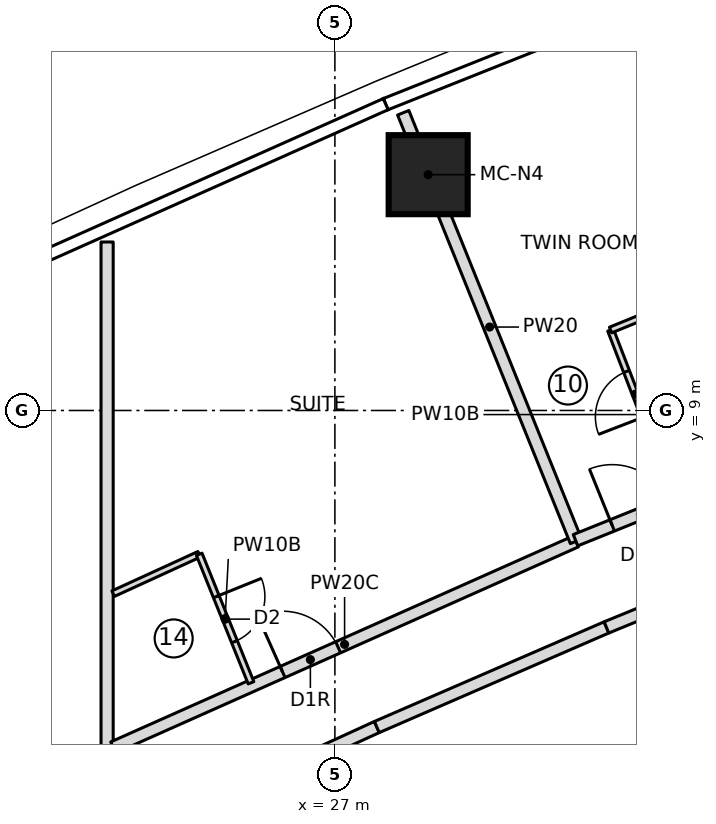
"""IFC4 building model, lengths in metres.
Left out: names, types, materials, properties, quantities, classifications, styles, units other than length and angle.
Written with IfcOpenShell. Run it as: python <this file> out.ifc"""

import sys

from ifc_helpers import new_model, si_unit, direction, frame, frame_2d, origin, origin_2d, place, context, subcontext, project, spatial, rectangle, extrude, element, fill, save


model = new_model("IFC4")
c1 = context("Model", 3, precision=1e-05, world=origin(), true_north=direction((0.0, 1.0)))
c2 = subcontext(c1, "Body", "Model", "MODEL_VIEW")
j1 = project(units=[si_unit("LENGTHUNIT", "METRE"), si_unit("PLANEANGLEUNIT", "RADIAN")], contexts=[c1])
p1 = place(None, origin())
s1 = spatial("IfcSite", under=j1, at=p1, CompositionType="ELEMENT")
p2 = place(p1, origin())
s2 = spatial("IfcBuilding", under=s1, at=p2, CompositionType="ELEMENT")
p3 = place(p2, frame((0.0, 0.0, 207.45)))
s3 = spatial("IfcBuildingStorey", under=s2, at=p3, CompositionType="ELEMENT", Elevation=207.45)
p4 = place(p3, frame((28.534, 12.878, 0.0), z_axis=(0.0, 0.0, 1.0), x_axis=(1.0, 0.0, 0.0)))
e1 = element("IfcColumn", 1, at=p4, inside=s3, PredefinedType="COLUMN", context=c2, shape_type="SweptSolid", body=[
    extrude(rectangle(XDim=1.3, YDim=1.3, at=origin_2d()), origin(), (0.0, 0.0, 1.0), 3.55),
])
p5 = place(p3, frame((23.254, -11.771, 0.0), z_axis=(0.0, 0.0, 1.0), x_axis=(0.0, 1.0, 0.0)))
e2 = element("IfcWall", 2, at=p5, inside=s3, PredefinedType="PARTITIONING", context=c2, shape_type="SweptSolid", body=[
    extrude(rectangle(XDim=23.542, YDim=0.2, at=frame_2d((11.771, 0.0))), origin(), (0.0, 0.0, 1.0), 3.15),
])
p6 = place(p5, frame((14.125, 0.0, 0.0)))
e3 = element("IfcOpeningElement", 3, at=p6, cuts=e2, PredefinedType="OPENING", context=c2, shape_type="SweptSolid", body=[
    extrude(rectangle(XDim=1.0, YDim=2.1, at=frame_2d((0.5, 1.05))), frame((0.0, 0.11, 0.0), z_axis=(0.0, -1.0, 0.0), x_axis=(1.0, 0.0, 0.0)), (0.0, 0.0, 1.0), 0.22),
])
p7 = place(p5, frame((8.417, 0.0, 0.0)))
e4 = element("IfcOpeningElement", 4, at=p7, cuts=e2, PredefinedType="OPENING", context=c2, shape_type="SweptSolid", body=[
    extrude(rectangle(XDim=1.0, YDim=2.1, at=frame_2d((0.5, 1.05))), frame((0.0, 0.11, 0.0), z_axis=(0.0, -1.0, 0.0), x_axis=(1.0, 0.0, 0.0)), (0.0, 0.0, 1.0), 0.22),
])
p8 = place(p3, frame((23.354, 3.458, 0.0), z_axis=(0.0, 0.0, 1.0), x_axis=(0.913485016927, 0.406872368009, 0.0)))
e5 = element("IfcWall", 5, at=p8, inside=s3, PredefinedType="PARTITIONING", context=c2, shape_type="SweptSolid", body=[
    extrude(rectangle(XDim=8.332, YDim=0.2, at=frame_2d((4.166, 0.0))), origin(), (0.0, 0.0, 1.0), 3.15),
])
p9 = place(p8, frame((3.05, 0.0, 0.0)))
e6 = element("IfcOpeningElement", 6, at=p9, cuts=e5, PredefinedType="OPENING", context=c2, shape_type="SweptSolid", body=[
    extrude(rectangle(XDim=1.0, YDim=2.1, at=frame_2d((0.5, 1.05))), frame((0.0, 0.11, 0.0), z_axis=(0.0, -1.0, 0.0), x_axis=(1.0, 0.0, 0.0)), (0.0, 0.0, 1.0), 0.22),
])
p10 = place(p3, frame((23.354, 5.987, 0.0), z_axis=(0.0, 0.0, 1.0), x_axis=(0.909158902999, 0.416449383597, 0.0)))
e7 = element("IfcWall", 7, at=p10, inside=s3, PredefinedType="PARTITIONING", context=c2, shape_type="SweptSolid", body=[
    extrude(rectangle(XDim=1.556, YDim=0.1, at=frame_2d((0.778, 0.0))), origin(), (0.0, 0.0, 1.0), 3.15),
])
p11 = place(p3, frame((24.769, 6.635, 0.0), z_axis=(0.0, 0.0, 1.0), x_axis=(0.373956446544, -0.927446265877, 0.0)))
e8 = element("IfcWall", 8, at=p11, inside=s3, PredefinedType="PARTITIONING", context=c2, shape_type="SweptSolid", body=[
    extrude(rectangle(XDim=2.279, YDim=0.1, at=frame_2d((1.14, 0.0))), origin(), (0.0, 0.0, 1.0), 3.15),
])
p12 = place(p11, frame((0.75, 0.0, 0.0)))
e9 = element("IfcOpeningElement", 9, at=p12, cuts=e8, PredefinedType="OPENING", context=c2, shape_type="SweptSolid", body=[
    extrude(rectangle(XDim=0.8, YDim=2.1, at=frame_2d((0.4, 1.05))), frame((0.0, 0.06, 0.0), z_axis=(0.0, -1.0, 0.0), x_axis=(1.0, 0.0, 0.0)), (0.0, 0.0, 1.0), 0.12),
])
p13 = place(p3, frame((30.965, 6.848, 0.0), z_axis=(0.0, 0.0, 1.0), x_axis=(-0.373876084216, 0.927478664796, 0.0)))
e10 = element("IfcWall", 10, at=p13, inside=s3, PredefinedType="PARTITIONING", context=c2, shape_type="SweptSolid", body=[
    extrude(rectangle(XDim=7.6, YDim=0.2, at=frame_2d((3.8, 0.0))), origin(), (0.0, 0.0, 1.0), 3.15),
])
p14 = place(p3, frame((30.958, 6.866, 0.0), z_axis=(0.0, 0.0, 1.0), x_axis=(0.927398695046, 0.374074404933, 0.0)))
e11 = element("IfcWall", 11, at=p14, inside=s3, PredefinedType="PARTITIONING", context=c2, shape_type="SweptSolid", body=[
    extrude(rectangle(XDim=4.311, YDim=0.2, at=frame_2d((2.155, 0.0))), origin(), (0.0, 0.0, 1.0), 3.15),
])
p15 = place(p14, frame((0.65, 0.0, 0.0)))
e12 = element("IfcOpeningElement", 12, at=p15, cuts=e11, PredefinedType="OPENING", context=c2, shape_type="SweptSolid", body=[
    extrude(rectangle(XDim=1.0, YDim=2.1, at=frame_2d((0.5, 1.05))), frame((0.0, 0.11, 0.0), z_axis=(0.0, -1.0, 0.0), x_axis=(1.0, 0.0, 0.0)), (0.0, 0.0, 1.0), 0.22),
])
p16 = place(p3, frame((32.605, 7.542, 0.0), z_axis=(0.0, 0.0, 1.0), x_axis=(-0.359637744424, 0.933092006603, 0.0)))
e13 = element("IfcWall", 13, at=p16, inside=s3, PredefinedType="PARTITIONING", context=c2, shape_type="SweptSolid", body=[
    extrude(rectangle(XDim=2.98, YDim=0.1, at=frame_2d((1.49, 0.0))), origin(), (0.0, 0.0, 1.0), 3.15),
])
p17 = place(p16, frame((1.45, 0.0, 0.0)))
e14 = element("IfcOpeningElement", 14, at=p17, cuts=e13, PredefinedType="OPENING", context=c2, shape_type="SweptSolid", body=[
    extrude(rectangle(XDim=0.8, YDim=2.1, at=frame_2d((0.4, 1.05))), frame((0.0, 0.06, 0.0), z_axis=(0.0, -1.0, 0.0), x_axis=(1.0, 0.0, 0.0)), (0.0, 0.0, 1.0), 0.12),
])
p18 = place(p3, frame((31.534, 10.323, 0.0), z_axis=(0.0, 0.0, 1.0), x_axis=(0.925906573805, 0.377752586469, 0.0)))
e15 = element("IfcWall", 15, at=p18, inside=s3, PredefinedType="PARTITIONING", context=c2, shape_type="SweptSolid", body=[
    extrude(rectangle(XDim=2.484, YDim=0.1, at=frame_2d((1.242, 0.0))), origin(), (0.0, 0.0, 1.0), 3.15),
])
p19 = place(p3, frame((23.947, 2.079, 0.0), z_axis=(0.0, 0.0, 1.0), x_axis=(0.909180834404, 0.416401501382, 0.0)))
e16 = element("IfcWall", 16, at=p19, inside=s3, PredefinedType="PARTITIONING", context=c2, shape_type="SweptSolid", body=[
    extrude(rectangle(XDim=4.117, YDim=0.2, at=frame_2d((2.059, 0.0))), origin(), (0.0, 0.0, 1.0), 3.15),
])
p20 = place(p3, frame((27.69, 3.793, 0.0), z_axis=(0.0, 0.0, 1.0), x_axis=(0.917375244839, 0.398023441717, 0.0)))
e17 = element("IfcWall", 17, at=p20, inside=s3, PredefinedType="PARTITIONING", context=c2, shape_type="SweptSolid", body=[
    extrude(rectangle(XDim=4.117, YDim=0.2, at=frame_2d((2.059, 0.0))), origin(), (0.0, 0.0, 1.0), 3.15),
])
p21 = place(p3, frame((31.467, 5.432, 0.0), z_axis=(0.0, 0.0, 1.0), x_axis=(0.925231428595, 0.379403220256, 0.0)))
e18 = element("IfcWall", 18, at=p21, inside=s3, PredefinedType="PARTITIONING", context=c2, shape_type="SweptSolid", body=[
    extrude(rectangle(XDim=2.135, YDim=0.2, at=frame_2d((1.067, 0.0))), origin(), (0.0, 0.0, 1.0), 3.15),
])
p22 = place(p12, origin())
e19 = element("IfcDoor", 19, at=p22, inside=s3, OperationType="SINGLE_SWING_LEFT", PredefinedType="DOOR", context=c2, shape_type="SweptSolid", body=[
    extrude(rectangle(XDim=0.8, YDim=2.1, at=frame_2d((0.4, 1.05))), frame((0.0, 0.025, 0.0), z_axis=(0.0, -1.0, 0.0), x_axis=(1.0, 0.0, 0.0)), (0.0, 0.0, 1.0), 0.05),
])
fill(e9, e19)
p23 = place(p9, origin())
e20 = element("IfcDoor", 20, at=p23, inside=s3, OperationType="SINGLE_SWING_RIGHT", PredefinedType="DOOR", context=c2, shape_type="SweptSolid", body=[
    extrude(rectangle(XDim=1.0, YDim=2.1, at=frame_2d((0.5, 1.05))), frame((0.0, 0.025, 0.0), z_axis=(0.0, -1.0, 0.0), x_axis=(1.0, 0.0, 0.0)), (0.0, 0.0, 1.0), 0.05),
])
fill(e6, e20)
p24 = place(p17, origin())
e21 = element("IfcDoor", 21, at=p24, inside=s3, OperationType="SINGLE_SWING_LEFT", PredefinedType="DOOR", context=c2, shape_type="SweptSolid", body=[
    extrude(rectangle(XDim=0.8, YDim=2.1, at=frame_2d((0.4, 1.05))), frame((0.0, 0.025, 0.0), z_axis=(0.0, -1.0, 0.0), x_axis=(1.0, 0.0, 0.0)), (0.0, 0.0, 1.0), 0.05),
])
fill(e14, e21)
p25 = place(p15, origin())
e22 = element("IfcDoor", 22, at=p25, inside=s3, OperationType="SINGLE_SWING_RIGHT", PredefinedType="DOOR", context=c2, shape_type="SweptSolid", body=[
    extrude(rectangle(XDim=1.0, YDim=2.1, at=frame_2d((0.5, 1.05))), frame((0.0, 0.025, 0.0), z_axis=(0.0, -1.0, 0.0), x_axis=(1.0, 0.0, 0.0)), (0.0, 0.0, 1.0), 0.05),
])
fill(e12, e22)
save(model, sys.argv[1])
